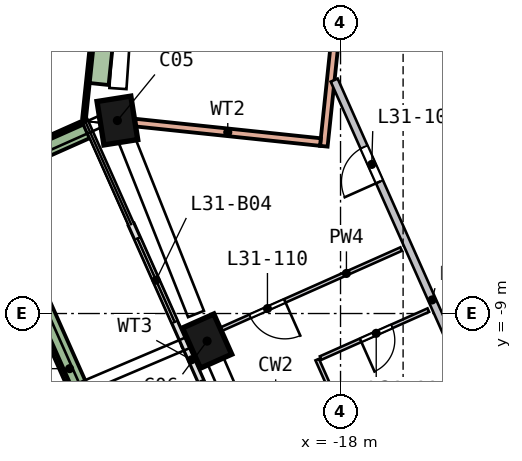
"""IFC4 building model, lengths in metres.
Left out: names, types, materials, properties, quantities, classifications, styles, units other than length and angle.
Written with IfcOpenShell. Run it as: python <this file> out.ifc"""

import sys

from ifc_helpers import new_model, si_unit, direction, frame, frame_2d, origin, origin_2d, place, context, subcontext, project, spatial, rectangle, extrude, element, fill, save


model = new_model("IFC4")
c1 = context("Model", 3, precision=1e-05, world=origin(), true_north=direction((0.0, 1.0)))
c2 = subcontext(c1, "Body", "Model", "MODEL_VIEW")
j1 = project(units=[si_unit("LENGTHUNIT", "METRE"), si_unit("PLANEANGLEUNIT", "RADIAN")], contexts=[c1])
p1 = place(None, origin())
s1 = spatial("IfcSite", under=j1, at=p1, CompositionType="ELEMENT")
p2 = place(p1, origin())
s2 = spatial("IfcBuilding", under=s1, at=p2, CompositionType="ELEMENT")
p3 = place(p2, frame((0.0, 0.0, 133.0)))
s3 = spatial("IfcBuildingStorey", under=s2, at=p3, CompositionType="ELEMENT", Elevation=133.0)
p4 = place(p3, frame((-23.895, -3.785, 0.0), z_axis=(0.018930659, -0.113431899, 0.993365408), x_axis=(-0.155197151, 0.981167478, 0.11499663)))
e1 = element("IfcColumn", 1, at=p4, inside=s3, PredefinedType="COLUMN", context=c2, shape_type="SweptSolid", body=[
    extrude(rectangle(XDim=1.15, YDim=0.9, at=origin_2d()), origin(), (0.0, 0.0, 1.0), 3.211),
])
p5 = place(p3, frame((-21.567, -9.602, 0.0), z_axis=(0.046542786, -0.102211608, 0.993673264), x_axis=(0.40410505, -0.907792136, -0.112305596)))
e2 = element("IfcColumn", 2, at=p5, inside=s3, PredefinedType="COLUMN", context=c2, shape_type="SweptSolid", body=[
    extrude(rectangle(XDim=1.15, YDim=0.9, at=origin_2d()), origin(), (0.0, 0.0, 1.0), 3.21),
])
p6 = place(p3, frame((-23.506, -6.662, 0.0), z_axis=(0.0, 0.0, 1.0), x_axis=(0.406718549, -0.913553514, 0.0)))
e3 = element("IfcWall", 3, at=p6, inside=s3, PredefinedType="SOLIDWALL", context=c2, shape_type="SweptSolid", body=[
    extrude(rectangle(XDim=3.475, YDim=0.15, at=frame_2d((1.737, 0.0))), origin(), (0.0, 0.0, 1.0), 2.475),
])
p7 = place(p6, frame((0.4, 0.0, 0.0)))
e4 = element("IfcOpeningElement", 4, at=p7, cuts=e3, PredefinedType="OPENING", context=c2, shape_type="SweptSolid", body=[
    extrude(rectangle(XDim=2.4, YDim=2.4, at=frame_2d((1.2, 1.2))), frame((0.0, 0.085, 0.0), z_axis=(0.0, -1.0, 0.0), x_axis=(1.0, 0.0, 0.0)), (0.0, 0.0, 1.0), 0.17),
])
p8 = place(p3, frame((-22.093, -9.836, 0.0), z_axis=(0.0, 0.0, 1.0), x_axis=(0.406740782, -0.913543615, 0.0)))
e5 = element("IfcWall", 5, at=p8, inside=s3, PredefinedType="SOLIDWALL", context=c2, shape_type="SweptSolid", body=[
    extrude(rectangle(XDim=3.835, YDim=0.15, at=frame_2d((1.918, 0.0))), origin(), (0.0, 0.0, 1.0), 2.475),
])
p9 = place(p8, frame((1.035, 0.0, 0.0)))
e6 = element("IfcOpeningElement", 6, at=p9, cuts=e5, PredefinedType="OPENING", context=c2, shape_type="SweptSolid", body=[
    extrude(rectangle(XDim=2.4, YDim=2.4, at=frame_2d((1.2, 1.2))), frame((0.0, 0.085, 0.0), z_axis=(0.0, -1.0, 0.0), x_axis=(1.0, 0.0, 0.0)), (0.0, 0.0, 1.0), 0.17),
])
p10 = place(p3, frame((-24.704, -4.157, 0.0), z_axis=(0.0, 0.0, 1.0), x_axis=(-0.913528084, -0.406775663, 0.0)))
e7 = element("IfcWall", 7, at=p10, inside=s3, PredefinedType="SOLIDWALL", context=c2, shape_type="SweptSolid", body=[
    extrude(rectangle(XDim=3.199, YDim=0.5, at=frame_2d((1.6, 0.0))), origin(), (0.0, 0.0, 1.0), 0.7),
])
p11 = place(p3, frame((-27.296, -5.585, 0.0), z_axis=(0.0, 0.0, 1.0), x_axis=(0.406740174, -0.913543886, 0.0)))
e8 = element("IfcWall", 8, at=p11, inside=s3, PredefinedType="SOLIDWALL", context=c2, shape_type="SweptSolid", body=[
    extrude(rectangle(XDim=10.652, YDim=0.5, at=frame_2d((5.326, 0.0))), origin(), (0.0, 0.0, 1.0), 0.7),
])
p12 = place(p3, frame((-18.44, -4.598, 0.0), z_axis=(0.0, 0.0, 1.0), x_axis=(0.104530323, 0.9945217, 0.0)))
e9 = element("IfcWall", 9, at=p12, inside=s3, PredefinedType="SOLIDWALL", context=c2, shape_type="SweptSolid", body=[
    extrude(rectangle(XDim=13.0, YDim=0.2, at=frame_2d((6.5, 0.0))), origin(), (0.0, 0.0, 1.0), 3.19),
])
p13 = place(p12, frame((5.6, 0.0, 0.0)))
e10 = element("IfcOpeningElement", 10, at=p13, cuts=e9, PredefinedType="OPENING", context=c2, shape_type="SweptSolid", body=[
    extrude(rectangle(XDim=1.8, YDim=2.4, at=frame_2d((0.9, 1.2))), frame((0.0, 0.11, 0.0), z_axis=(0.0, -1.0, 0.0), x_axis=(1.0, 0.0, 0.0)), (0.0, 0.0, 1.0), 0.22),
])
p14 = place(p3, frame((-23.406, -3.975, 0.0), z_axis=(0.0, 0.0, 1.0), x_axis=(0.994519629, -0.104550021, 0.0)))
e11 = element("IfcWall", 11, at=p14, inside=s3, PredefinedType="SOLIDWALL", context=c2, shape_type="SweptSolid", body=[
    extrude(rectangle(XDim=4.904, YDim=0.2, at=frame_2d((2.452, 0.0))), origin(), (0.0, 0.0, 1.0), 3.19),
])
p15 = place(p3, frame((-23.405, 8.915, 0.0), z_axis=(0.0, 0.0, 1.0), x_axis=(-0.104538298, -0.994520862, 0.0)))
e12 = element("IfcWall", 12, at=p15, inside=s3, PredefinedType="SOLIDWALL", context=c2, shape_type="SweptSolid", body=[
    extrude(rectangle(XDim=12.84, YDim=0.1, at=frame_2d((6.42, 0.0))), origin(), (0.0, 0.0, 1.0), 0.7),
])
p16 = place(p3, frame((-23.885, 1.469, 0.0), z_axis=(0.0, 0.0, 1.0), x_axis=(-0.104527854, -0.994521959, 0.0)))
e13 = element("IfcWall", 13, at=p16, inside=s3, PredefinedType="SOLIDWALL", context=c2, shape_type="SweptSolid", body=[
    extrude(rectangle(XDim=4.454, YDim=0.5, at=frame_2d((2.227, 0.0))), origin(), (0.0, 0.0, 1.0), 0.7),
])
p17 = place(p3, frame((-14.288, -11.57, 0.0), z_axis=(0.0, 0.0, 1.0), x_axis=(-0.40673695, 0.913545321, 0.0)))
e14 = element("IfcWall", 14, at=p17, inside=s3, PredefinedType="SOLIDWALL", context=c2, shape_type="SweptSolid", body=[
    extrude(rectangle(XDim=9.537, YDim=0.2, at=frame_2d((4.768, 0.0))), origin(), (0.0, 0.0, 1.0), 3.19),
])
p18 = place(p17, frame((6.608, 0.0, 0.0)))
e15 = element("IfcOpeningElement", 15, at=p18, cuts=e14, PredefinedType="OPENING", context=c2, shape_type="SweptSolid", body=[
    extrude(rectangle(XDim=1.0, YDim=2.1, at=frame_2d((0.5, 1.05))), frame((0.0, 0.11, 0.0), z_axis=(0.0, -1.0, 0.0), x_axis=(1.0, 0.0, 0.0)), (0.0, 0.0, 1.0), 0.22),
])
p19 = place(p3, frame((-16.406, -7.304, 0.0), z_axis=(0.0, 0.0, 1.0), x_axis=(-0.913546162, -0.406735062, 0.0)))
e16 = element("IfcWall", 16, at=p19, inside=s3, PredefinedType="PARTITIONING", context=c2, shape_type="SweptSolid", body=[
    extrude(rectangle(XDim=6.15, YDim=0.1, at=frame_2d((3.075, 0.0))), origin(), (0.0, 0.0, 1.0), 3.19),
])
p20 = place(p19, frame((3.35, 0.0, 0.0)))
e17 = element("IfcOpeningElement", 17, at=p20, cuts=e16, PredefinedType="OPENING", context=c2, shape_type="SweptSolid", body=[
    extrude(rectangle(XDim=1.0, YDim=2.1, at=frame_2d((0.5, 1.05))), frame((0.0, 0.06, 0.0), z_axis=(0.0, -1.0, 0.0), x_axis=(1.0, 0.0, 0.0)), (0.0, 0.0, 1.0), 0.12),
])
p21 = place(p3, frame((-18.614, -10.212, 0.0), z_axis=(0.0, 0.0, 1.0), x_axis=(0.406743817, -0.913542263, 0.0)))
e18 = element("IfcWall", 18, at=p21, inside=s3, PredefinedType="PARTITIONING", context=c2, shape_type="SweptSolid", body=[
    extrude(rectangle(XDim=3.704, YDim=0.1, at=frame_2d((1.852, 0.0))), origin(), (0.0, 0.0, 1.0), 3.19),
])
p22 = place(p3, frame((-15.691, -8.911, 0.0), z_axis=(0.0, 0.0, 1.0), x_axis=(-0.913564558, -0.40669374, 0.0)))
e19 = element("IfcWall", 19, at=p22, inside=s3, PredefinedType="PARTITIONING", context=c2, shape_type="SweptSolid", body=[
    extrude(rectangle(XDim=3.1, YDim=0.1, at=frame_2d((1.55, 0.0))), origin(), (0.0, 0.0, 1.0), 3.19),
])
p23 = place(p22, frame((1.05, 0.0, 0.0)))
e20 = element("IfcOpeningElement", 20, at=p23, cuts=e19, PredefinedType="OPENING", context=c2, shape_type="SweptSolid", body=[
    extrude(rectangle(XDim=0.9, YDim=2.1, at=frame_2d((0.45, 1.05))), frame((0.0, 0.06, 0.0), z_axis=(0.0, -1.0, 0.0), x_axis=(1.0, 0.0, 0.0)), (0.0, 0.0, 1.0), 0.12),
])
p24 = place(p7, origin())
e21 = element("IfcDoor", 21, at=p24, inside=s3, OperationType="SLIDING_TO_RIGHT", PredefinedType="DOOR", context=c2, shape_type="SweptSolid", body=[
    extrude(rectangle(XDim=2.4, YDim=2.4, at=frame_2d((1.2, 1.2))), frame((0.0, 0.025, 0.0), z_axis=(0.0, -1.0, 0.0), x_axis=(1.0, 0.0, 0.0)), (0.0, 0.0, 1.0), 0.05),
])
fill(e4, e21)
p25 = place(p18, origin())
e22 = element("IfcDoor", 22, at=p25, inside=s3, OperationType="SINGLE_SWING_LEFT", PredefinedType="DOOR", context=c2, shape_type="SweptSolid", body=[
    extrude(rectangle(XDim=1.0, YDim=2.1, at=frame_2d((0.5, 1.05))), frame((0.0, 0.025, 0.0), z_axis=(0.0, -1.0, 0.0), x_axis=(1.0, 0.0, 0.0)), (0.0, 0.0, 1.0), 0.05),
])
fill(e15, e22)
p26 = place(p20, origin())
e23 = element("IfcDoor", 23, at=p26, inside=s3, OperationType="SINGLE_SWING_LEFT", PredefinedType="DOOR", context=c2, shape_type="SweptSolid", body=[
    extrude(rectangle(XDim=1.0, YDim=2.1, at=frame_2d((0.5, 1.05))), frame((0.0, 0.025, 0.0), z_axis=(0.0, -1.0, 0.0), x_axis=(1.0, 0.0, 0.0)), (0.0, 0.0, 1.0), 0.05),
])
fill(e17, e23)
p27 = place(p23, origin())
e24 = element("IfcDoor", 24, at=p27, inside=s3, OperationType="SINGLE_SWING_RIGHT", PredefinedType="DOOR", context=c2, shape_type="SweptSolid", body=[
    extrude(rectangle(XDim=0.9, YDim=2.1, at=frame_2d((0.45, 1.05))), frame((0.0, 0.025, 0.0), z_axis=(0.0, -1.0, 0.0), x_axis=(1.0, 0.0, 0.0)), (0.0, 0.0, 1.0), 0.05),
])
fill(e20, e24)
save(model, sys.argv[1])
